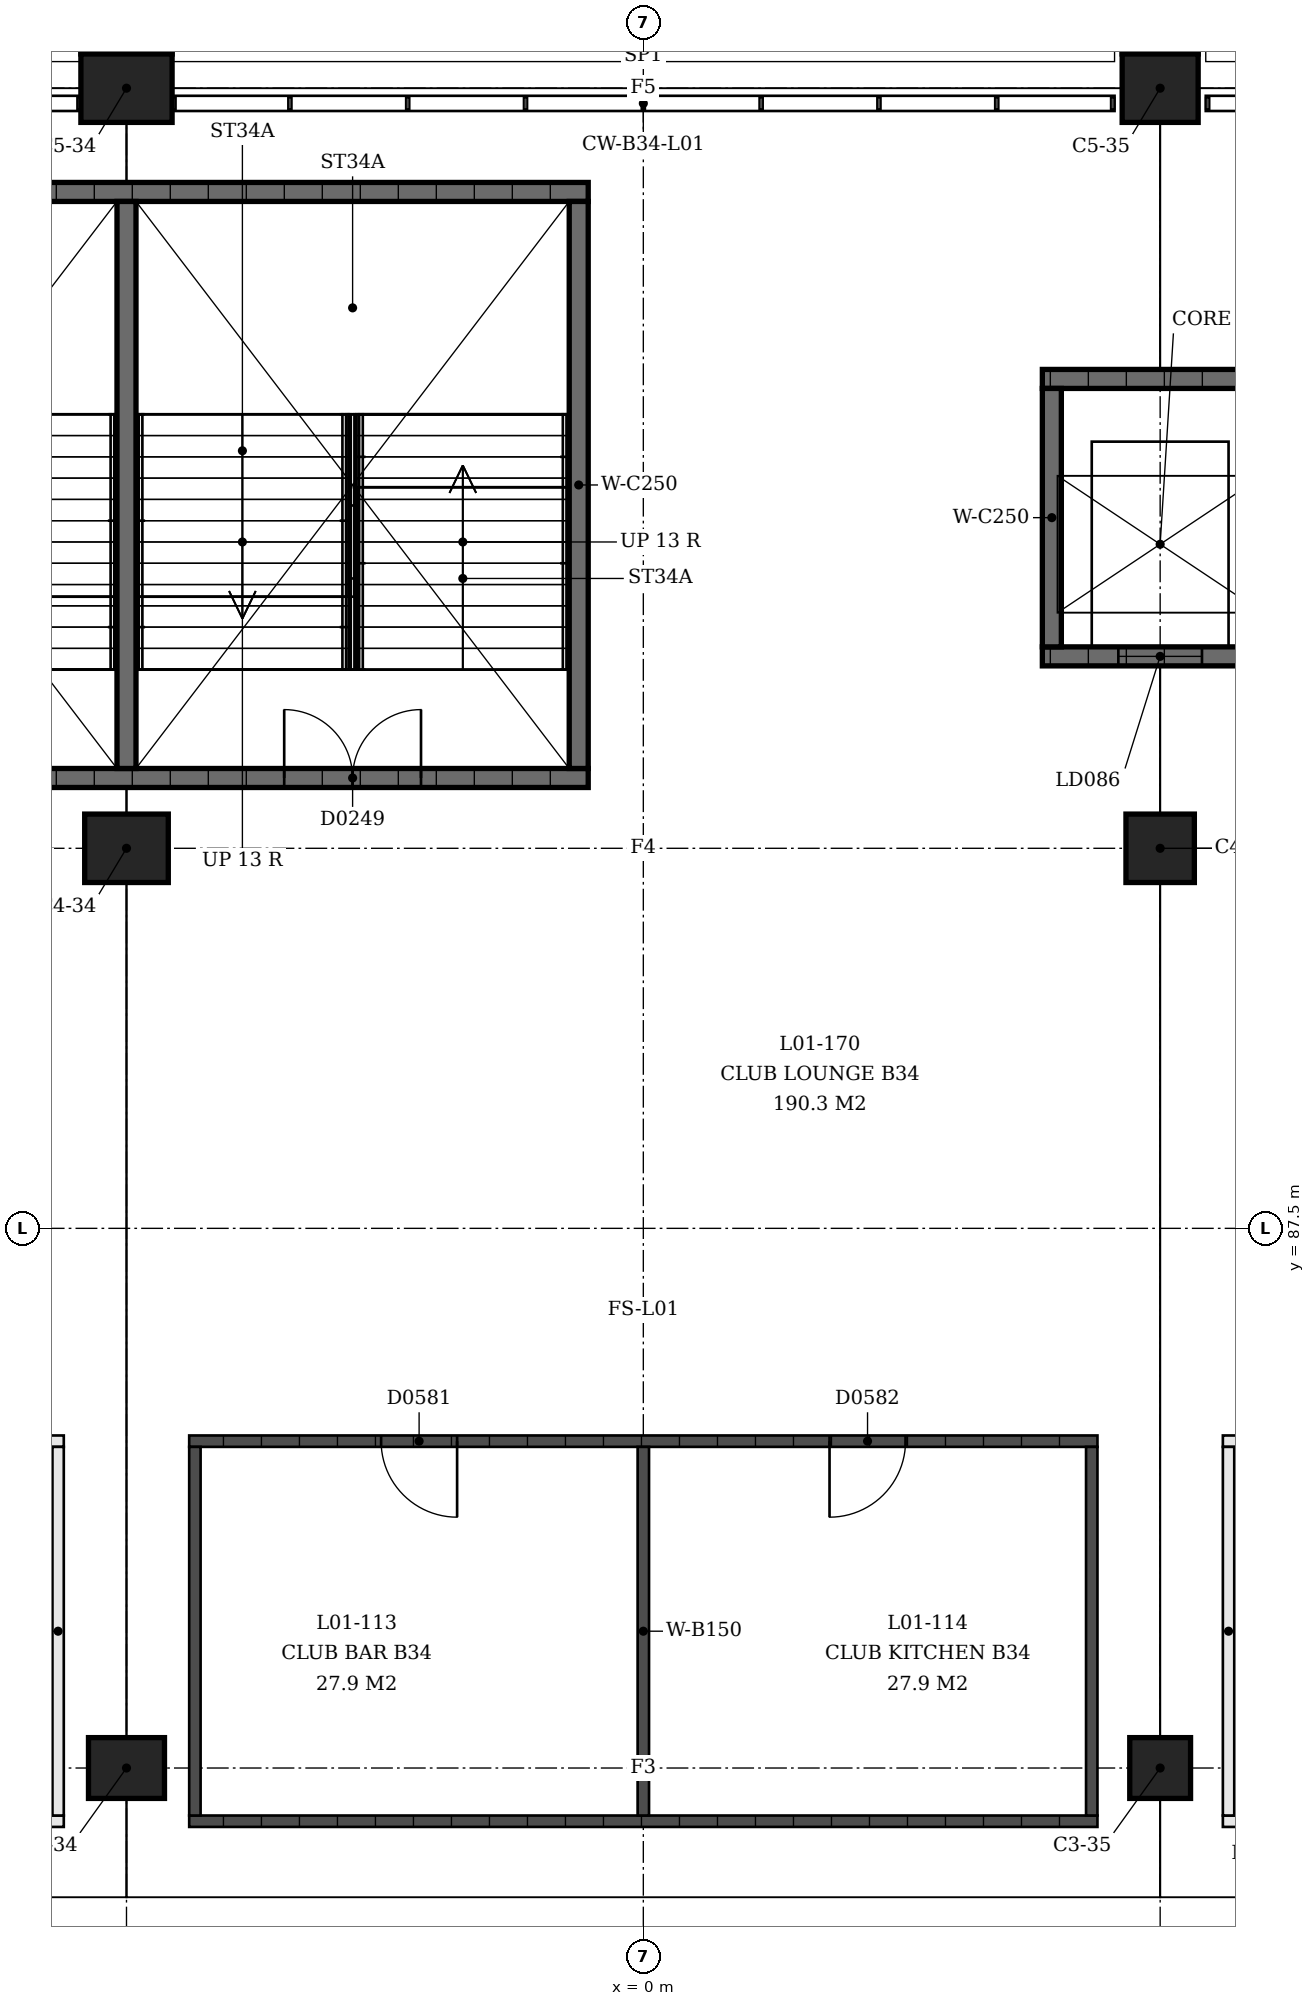
"""IFC4 building model, lengths in metres.
Left out: names, types, materials, properties, quantities, classifications, styles, units other than length and angle.
Written with IfcOpenShell. Run it as: python <this file> out.ifc"""

import sys

from ifc_helpers import new_model, si_unit, direction, frame, frame_2d, origin, origin_2d, place, context, subcontext, project, spatial, rectangle, extrude, element, fill, save


model = new_model("IFC4")
c1 = context("Model", 3, precision=1e-05, world=origin(), true_north=direction((0.0, 1.0)))
c2 = subcontext(c1, "Body", "Model", "MODEL_VIEW")
j1 = project(units=[si_unit("LENGTHUNIT", "METRE"), si_unit("PLANEANGLEUNIT", "RADIAN")], contexts=[c1])
p1 = place(None, origin())
s1 = spatial("IfcSite", under=j1, at=p1, CompositionType="ELEMENT")
p2 = place(p1, origin())
s2 = spatial("IfcBuilding", under=s1, at=p2, CompositionType="ELEMENT")
p3 = place(p2, frame((0.0, 0.0, 4.5)))
s3 = spatial("IfcBuildingStorey", under=s2, at=p3, CompositionType="ELEMENT", Elevation=4.5)
p4 = place(p3, frame((-6.8, 80.4, 0.0), z_axis=(0.0, 0.0, 1.0), x_axis=(-1.0, 0.0, 0.0)))
e1 = element("IfcColumn", 1, at=p4, inside=s3, PredefinedType="COLUMN", context=c2, shape_type="SweptSolid", body=[
    extrude(rectangle(XDim=1.0, YDim=0.8, at=origin_2d()), origin(), (0.0, 0.0, 1.0), 4.5),
])
p5 = place(p3, frame((-6.8, 92.5, 0.0), z_axis=(0.0, 0.0, 1.0), x_axis=(-1.0, 0.0, 0.0)))
e2 = element("IfcColumn", 2, at=p5, inside=s3, PredefinedType="COLUMN", context=c2, shape_type="SweptSolid", body=[
    extrude(rectangle(XDim=1.1, YDim=0.9, at=origin_2d()), origin(), (0.0, 0.0, 1.0), 4.5),
])
p6 = place(p3, frame((-6.8, 102.5, 0.0), z_axis=(0.0, 0.0, 1.0), x_axis=(-1.0, 0.0, 0.0)))
e3 = element("IfcColumn", 3, at=p6, inside=s3, PredefinedType="COLUMN", context=c2, shape_type="SweptSolid", body=[
    extrude(rectangle(XDim=1.2, YDim=0.9, at=origin_2d()), origin(), (0.0, 0.0, 1.0), 4.5),
])
p7 = place(p3, frame((6.8, 80.4, 0.0), z_axis=(0.0, 0.0, 1.0), x_axis=(-1.0, 0.0, 0.0)))
e4 = element("IfcColumn", 4, at=p7, inside=s3, PredefinedType="COLUMN", context=c2, shape_type="SweptSolid", body=[
    extrude(rectangle(XDim=0.8, YDim=0.8, at=origin_2d()), origin(), (0.0, 0.0, 1.0), 4.5),
])
p8 = place(p3, frame((6.8, 92.5, 0.0), z_axis=(0.0, 0.0, 1.0), x_axis=(-1.0, 0.0, 0.0)))
e5 = element("IfcColumn", 5, at=p8, inside=s3, PredefinedType="COLUMN", context=c2, shape_type="SweptSolid", body=[
    extrude(rectangle(XDim=0.9, YDim=0.9, at=origin_2d()), origin(), (0.0, 0.0, 1.0), 4.5),
])
p9 = place(p3, frame((6.8, 102.5, 0.0), z_axis=(0.0, 0.0, 1.0), x_axis=(-1.0, 0.0, 0.0)))
e6 = element("IfcColumn", 6, at=p9, inside=s3, PredefinedType="COLUMN", context=c2, shape_type="SweptSolid", body=[
    extrude(rectangle(XDim=1.0, YDim=0.9, at=origin_2d()), origin(), (0.0, 0.0, 1.0), 4.5),
])
p10 = place(p3, frame((-0.725, 93.425, 0.0), z_axis=(0.0, 0.0, 1.0), x_axis=(-1.0, 0.0, 0.0)))
e7 = element("IfcWall", 7, at=p10, inside=s3, PredefinedType="SHEAR", context=c2, shape_type="SweptSolid", body=[
    extrude(rectangle(XDim=12.15, YDim=0.25, at=frame_2d((6.075, 0.0))), origin(), (0.0, 0.0, 1.0), 4.09),
])
p11 = place(p10, frame((2.2, 0.0, 0.0)))
e8 = element("IfcOpeningElement", 8, at=p11, cuts=e7, PredefinedType="OPENING", context=c2, shape_type="SweptSolid", body=[
    extrude(rectangle(XDim=1.8, YDim=2.1, at=frame_2d((0.9, 1.05))), frame((0.0, 0.125, 0.0), z_axis=(0.0, -1.0, 0.0), x_axis=(1.0, 0.0, 0.0)), (0.0, 0.0, 1.0), 0.25),
])
p12 = place(p10, frame((8.15, 0.0, 0.0)))
e9 = element("IfcOpeningElement", 9, at=p12, cuts=e7, PredefinedType="OPENING", context=c2, shape_type="SweptSolid", body=[
    extrude(rectangle(XDim=1.8, YDim=2.1, at=frame_2d((0.9, 1.05))), frame((0.0, 0.125, 0.0), z_axis=(0.0, -1.0, 0.0), x_axis=(1.0, 0.0, 0.0)), (0.0, 0.0, 1.0), 0.25),
])
p13 = place(p3, frame((-0.725, 101.135, 0.0), z_axis=(0.0, 0.0, 1.0), x_axis=(-1.0, 0.0, 0.0)))
e10 = element("IfcWall", 10, at=p13, inside=s3, PredefinedType="SHEAR", context=c2, shape_type="SweptSolid", body=[
    extrude(rectangle(XDim=12.15, YDim=0.25, at=frame_2d((6.075, 0.0))), origin(), (0.0, 0.0, 1.0), 4.09),
])
for number, where, z_axis, x_axis in (
    (11, (-0.85, 93.55, 0.0), (0.0, 0.0, 1.0), (0.0, 1.0, 0.0)),
    (12, (-6.8, 93.55, 0.0), (0.0, 0.0, 1.0), (0.0, 1.0, 0.0)),
):
    element("IfcWall", number, at=place(p3, frame(where, z_axis=z_axis, x_axis=x_axis)), inside=s3, PredefinedType="SHEAR", context=c2, shape_type="SweptSolid", body=[
        extrude(rectangle(XDim=7.46, YDim=0.25, at=frame_2d((3.73, 0.0))), origin(), (0.0, 0.0, 1.0), 4.09),
    ])
p14 = place(p3, frame((8.35, 95.025, 0.0), z_axis=(0.0, 0.0, 1.0), x_axis=(-1.0, 0.0, 0.0)))
e13 = element("IfcWall", 13, at=p14, inside=s3, PredefinedType="SHEAR", context=c2, shape_type="SweptSolid", body=[
    extrude(rectangle(XDim=3.1, YDim=0.25, at=frame_2d((1.55, 0.0))), origin(), (0.0, 0.0, 1.0), 4.09),
])
p15 = place(p14, frame((1.0, 0.0, 0.0)))
e14 = element("IfcOpeningElement", 14, at=p15, cuts=e13, PredefinedType="OPENING", context=c2, shape_type="SweptSolid", body=[
    extrude(rectangle(XDim=1.1, YDim=2.1, at=frame_2d((0.55, 1.05))), frame((0.0, 0.125, 0.0), z_axis=(0.0, -1.0, 0.0), x_axis=(1.0, 0.0, 0.0)), (0.0, 0.0, 1.0), 0.25),
])
p16 = place(p3, frame((8.35, 98.675, 0.0), z_axis=(0.0, 0.0, 1.0), x_axis=(-1.0, 0.0, 0.0)))
e15 = element("IfcWall", 15, at=p16, inside=s3, PredefinedType="SHEAR", context=c2, shape_type="SweptSolid", body=[
    extrude(rectangle(XDim=3.1, YDim=0.25, at=frame_2d((1.55, 0.0))), origin(), (0.0, 0.0, 1.0), 4.09),
])
p17 = place(p3, frame((5.375, 95.15, 0.0), z_axis=(0.0, 0.0, 1.0), x_axis=(0.0, 1.0, 0.0)))
e16 = element("IfcWall", 16, at=p17, inside=s3, PredefinedType="SHEAR", context=c2, shape_type="SweptSolid", body=[
    extrude(rectangle(XDim=3.4, YDim=0.25, at=frame_2d((1.7, 0.0))), origin(), (0.0, 0.0, 1.0), 4.09),
])
p18 = place(p3, frame((-7.625, 79.7, 0.0), z_axis=(0.0, 0.0, 1.0), x_axis=(-1.0, 0.0, 0.0)))
e17 = element("IfcWall", 17, at=p18, inside=s3, PredefinedType="PARTITIONING", context=c2, shape_type="SweptSolid", body=[
    extrude(rectangle(XDim=11.95, YDim=0.15, at=frame_2d((5.975, 0.0))), origin(), (0.0, 0.0, 1.0), 3.0),
])
p19 = place(p3, frame((-7.625, 84.7, 0.0), z_axis=(0.0, 0.0, 1.0), x_axis=(-1.0, 0.0, 0.0)))
e18 = element("IfcWall", 18, at=p19, inside=s3, PredefinedType="PARTITIONING", context=c2, shape_type="SweptSolid", body=[
    extrude(rectangle(XDim=11.95, YDim=0.15, at=frame_2d((5.975, 0.0))), origin(), (0.0, 0.0, 1.0), 3.0),
])
p20 = place(p19, frame((1.454, 0.0, 0.0)))
e19 = element("IfcOpeningElement", 19, at=p20, cuts=e18, PredefinedType="OPENING", context=c2, shape_type="SweptSolid", body=[
    extrude(rectangle(XDim=0.9, YDim=2.1, at=frame_2d((0.45, 1.05))), frame((0.0, 0.075, 0.0), z_axis=(0.0, -1.0, 0.0), x_axis=(1.0, 0.0, 0.0)), (0.0, 0.0, 1.0), 0.15),
])
p21 = place(p19, frame((5.112, 0.0, 0.0)))
e20 = element("IfcOpeningElement", 20, at=p21, cuts=e18, PredefinedType="OPENING", context=c2, shape_type="SweptSolid", body=[
    extrude(rectangle(XDim=0.9, YDim=2.1, at=frame_2d((0.45, 1.05))), frame((0.0, 0.075, 0.0), z_axis=(0.0, -1.0, 0.0), x_axis=(1.0, 0.0, 0.0)), (0.0, 0.0, 1.0), 0.15),
])
p22 = place(p19, frame((7.962, 0.0, 0.0)))
e21 = element("IfcOpeningElement", 21, at=p22, cuts=e18, PredefinedType="OPENING", context=c2, shape_type="SweptSolid", body=[
    extrude(rectangle(XDim=1.1, YDim=2.1, at=frame_2d((0.55, 1.05))), frame((0.0, 0.075, 0.0), z_axis=(0.0, -1.0, 0.0), x_axis=(1.0, 0.0, 0.0)), (0.0, 0.0, 1.0), 0.15),
])
p23 = place(p19, frame((10.204, 0.0, 0.0)))
e22 = element("IfcOpeningElement", 22, at=p23, cuts=e18, PredefinedType="OPENING", context=c2, shape_type="SweptSolid", body=[
    extrude(rectangle(XDim=1.1, YDim=2.1, at=frame_2d((0.55, 1.05))), frame((0.0, 0.075, 0.0), z_axis=(0.0, -1.0, 0.0), x_axis=(1.0, 0.0, 0.0)), (0.0, 0.0, 1.0), 0.15),
])
p24 = place(p3, frame((-7.7, 79.775, 0.0), z_axis=(0.0, 0.0, 1.0), x_axis=(0.0, 1.0, 0.0)))
e23 = element("IfcWall", 23, at=p24, inside=s3, PredefinedType="PARTITIONING", context=c2, shape_type="SweptSolid", body=[
    extrude(rectangle(XDim=4.85, YDim=0.15, at=frame_2d((2.425, 0.0))), origin(), (0.0, 0.0, 1.0), 3.0),
])
p25 = place(p3, frame((-5.975, 79.7, 0.0), z_axis=(0.0, 0.0, 1.0), x_axis=(1.0, 0.0, 0.0)))
e24 = element("IfcWall", 24, at=p25, inside=s3, PredefinedType="SOLIDWALL", context=c2, shape_type="SweptSolid", body=[
    extrude(rectangle(XDim=11.95, YDim=0.15, at=frame_2d((5.975, 0.0))), origin(), (0.0, 0.0, 1.0), 3.0),
])
p26 = place(p3, frame((-5.975, 84.7, 0.0), z_axis=(0.0, 0.0, 1.0), x_axis=(1.0, 0.0, 0.0)))
e25 = element("IfcWall", 25, at=p26, inside=s3, PredefinedType="SOLIDWALL", context=c2, shape_type="SweptSolid", body=[
    extrude(rectangle(XDim=11.95, YDim=0.15, at=frame_2d((5.975, 0.0))), origin(), (0.0, 0.0, 1.0), 3.0),
])
p27 = place(p26, frame((2.525, 0.0, 0.0)))
e26 = element("IfcOpeningElement", 26, at=p27, cuts=e25, PredefinedType="OPENING", context=c2, shape_type="SweptSolid", body=[
    extrude(rectangle(XDim=1.0, YDim=2.1, at=frame_2d((0.5, 1.05))), frame((0.0, 0.075, 0.0), z_axis=(0.0, -1.0, 0.0), x_axis=(1.0, 0.0, 0.0)), (0.0, 0.0, 1.0), 0.15),
])
p28 = place(p26, frame((8.425, 0.0, 0.0)))
e27 = element("IfcOpeningElement", 27, at=p28, cuts=e25, PredefinedType="OPENING", context=c2, shape_type="SweptSolid", body=[
    extrude(rectangle(XDim=1.0, YDim=2.1, at=frame_2d((0.5, 1.05))), frame((0.0, 0.075, 0.0), z_axis=(0.0, -1.0, 0.0), x_axis=(1.0, 0.0, 0.0)), (0.0, 0.0, 1.0), 0.15),
])
for number, where, z_axis, x_axis in (
    (28, (-5.9, 79.775, 0.0), (0.0, 0.0, 1.0), (0.0, 1.0, 0.0)),
    (29, (0.0, 79.775, 0.0), (0.0, 0.0, 1.0), (0.0, 1.0, 0.0)),
    (30, (5.9, 79.775, 0.0), (0.0, 0.0, 1.0), (0.0, 1.0, 0.0)),
):
    element("IfcWall", number, at=place(p3, frame(where, z_axis=z_axis, x_axis=x_axis)), inside=s3, PredefinedType="SOLIDWALL", context=c2, shape_type="SweptSolid", body=[
        extrude(rectangle(XDim=4.85, YDim=0.15, at=frame_2d((2.425, 0.0))), origin(), (0.0, 0.0, 1.0), 3.0),
    ])
p29 = place(p3, frame((19.575, 79.7, 0.0), z_axis=(0.0, 0.0, 1.0), x_axis=(-1.0, 0.0, 0.0)))
e31 = element("IfcWall", 31, at=p29, inside=s3, PredefinedType="PARTITIONING", context=c2, shape_type="SweptSolid", body=[
    extrude(rectangle(XDim=11.95, YDim=0.15, at=frame_2d((5.975, 0.0))), origin(), (0.0, 0.0, 1.0), 3.0),
])
p30 = place(p3, frame((19.575, 84.7, 0.0), z_axis=(0.0, 0.0, 1.0), x_axis=(-1.0, 0.0, 0.0)))
e32 = element("IfcWall", 32, at=p30, inside=s3, PredefinedType="PARTITIONING", context=c2, shape_type="SweptSolid", body=[
    extrude(rectangle(XDim=11.95, YDim=0.15, at=frame_2d((5.975, 0.0))), origin(), (0.0, 0.0, 1.0), 3.0),
])
p31 = place(p30, frame((1.454, 0.0, 0.0)))
e33 = element("IfcOpeningElement", 33, at=p31, cuts=e32, PredefinedType="OPENING", context=c2, shape_type="SweptSolid", body=[
    extrude(rectangle(XDim=0.9, YDim=2.1, at=frame_2d((0.45, 1.05))), frame((0.0, 0.075, 0.0), z_axis=(0.0, -1.0, 0.0), x_axis=(1.0, 0.0, 0.0)), (0.0, 0.0, 1.0), 0.15),
])
p32 = place(p30, frame((5.112, 0.0, 0.0)))
e34 = element("IfcOpeningElement", 34, at=p32, cuts=e32, PredefinedType="OPENING", context=c2, shape_type="SweptSolid", body=[
    extrude(rectangle(XDim=0.9, YDim=2.1, at=frame_2d((0.45, 1.05))), frame((0.0, 0.075, 0.0), z_axis=(0.0, -1.0, 0.0), x_axis=(1.0, 0.0, 0.0)), (0.0, 0.0, 1.0), 0.15),
])
p33 = place(p30, frame((7.962, 0.0, 0.0)))
e35 = element("IfcOpeningElement", 35, at=p33, cuts=e32, PredefinedType="OPENING", context=c2, shape_type="SweptSolid", body=[
    extrude(rectangle(XDim=1.1, YDim=2.1, at=frame_2d((0.55, 1.05))), frame((0.0, 0.075, 0.0), z_axis=(0.0, -1.0, 0.0), x_axis=(1.0, 0.0, 0.0)), (0.0, 0.0, 1.0), 0.15),
])
p34 = place(p30, frame((10.204, 0.0, 0.0)))
e36 = element("IfcOpeningElement", 36, at=p34, cuts=e32, PredefinedType="OPENING", context=c2, shape_type="SweptSolid", body=[
    extrude(rectangle(XDim=1.1, YDim=2.1, at=frame_2d((0.55, 1.05))), frame((0.0, 0.075, 0.0), z_axis=(0.0, -1.0, 0.0), x_axis=(1.0, 0.0, 0.0)), (0.0, 0.0, 1.0), 0.15),
])
p35 = place(p3, frame((7.7, 79.775, 0.0), z_axis=(0.0, 0.0, 1.0), x_axis=(0.0, 1.0, 0.0)))
e37 = element("IfcWall", 37, at=p35, inside=s3, PredefinedType="PARTITIONING", context=c2, shape_type="SweptSolid", body=[
    extrude(rectangle(XDim=4.85, YDim=0.15, at=frame_2d((2.425, 0.0))), origin(), (0.0, 0.0, 1.0), 3.0),
])
p36 = place(p11, origin())
e38 = element("IfcDoor", 38, at=p36, inside=s3, OperationType="DOUBLE_DOOR_SINGLE_SWING", PredefinedType="DOOR", context=c2, shape_type="SweptSolid", body=[
    extrude(rectangle(XDim=1.8, YDim=2.1, at=frame_2d((0.9, 1.05))), frame((0.0, 0.025, 0.0), z_axis=(0.0, -1.0, 0.0), x_axis=(1.0, 0.0, 0.0)), (0.0, 0.0, 1.0), 0.05),
])
fill(e8, e38)
p37 = place(p15, origin())
e39 = element("IfcDoor", 39, at=p37, inside=s3, OperationType="SLIDING_TO_LEFT", PredefinedType="DOOR", context=c2, shape_type="SweptSolid", body=[
    extrude(rectangle(XDim=1.1, YDim=2.1, at=frame_2d((0.55, 1.05))), frame((0.0, 0.025, 0.0), z_axis=(0.0, -1.0, 0.0), x_axis=(1.0, 0.0, 0.0)), (0.0, 0.0, 1.0), 0.05),
])
fill(e14, e39)
p38 = place(p27, origin())
e40 = element("IfcDoor", 40, at=p38, inside=s3, OperationType="SINGLE_SWING_RIGHT", PredefinedType="DOOR", context=c2, shape_type="SweptSolid", body=[
    extrude(rectangle(XDim=1.0, YDim=2.1, at=frame_2d((0.5, 1.05))), frame((0.0, 0.025, 0.0), z_axis=(0.0, -1.0, 0.0), x_axis=(1.0, 0.0, 0.0)), (0.0, 0.0, 1.0), 0.05),
])
fill(e26, e40)
p39 = place(p28, origin())
e41 = element("IfcDoor", 41, at=p39, inside=s3, OperationType="SINGLE_SWING_LEFT", PredefinedType="DOOR", context=c2, shape_type="SweptSolid", body=[
    extrude(rectangle(XDim=1.0, YDim=2.1, at=frame_2d((0.5, 1.05))), frame((0.0, 0.025, 0.0), z_axis=(0.0, -1.0, 0.0), x_axis=(1.0, 0.0, 0.0)), (0.0, 0.0, 1.0), 0.05),
])
fill(e27, e41)
save(model, sys.argv[1])
